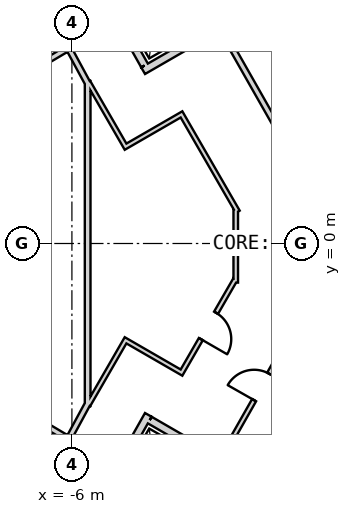
"""IFC4 building model, lengths in metres.
Left out: names, types, materials, properties, quantities, classifications, styles, units other than length and angle.
Written with IfcOpenShell. Run it as: python <this file> out.ifc"""

import sys

from ifc_helpers import new_model, si_unit, direction, frame, frame_2d, origin, place, context, subcontext, project, spatial, rectangle, extrude, element, fill, save


model = new_model("IFC4")
c1 = context("Model", 3, precision=1e-05, world=origin(), true_north=direction((0.0, 1.0)))
c2 = subcontext(c1, "Body", "Model", "MODEL_VIEW")
j1 = project(units=[si_unit("LENGTHUNIT", "METRE"), si_unit("PLANEANGLEUNIT", "RADIAN")], contexts=[c1])
p1 = place(None, origin())
s1 = spatial("IfcSite", under=j1, at=p1, CompositionType="ELEMENT")
p2 = place(p1, origin())
s2 = spatial("IfcBuilding", under=s1, at=p2, CompositionType="ELEMENT")
p3 = place(p2, frame((0.0, 0.0, 392.3)))
s3 = spatial("IfcBuildingStorey", under=s2, at=p3, CompositionType="ELEMENT", Elevation=392.3)
p4 = place(p3, frame((19.475, 2.208, 0.0), z_axis=(0.0, 0.0, 1.0), x_axis=(-0.866028369851, 0.499994862586, 0.0)))
e1 = element("IfcWall", 1, at=p4, inside=s3, PredefinedType="SHEAR", context=c2, shape_type="SweptSolid", body=[
    extrude(rectangle(XDim=31.523, YDim=0.9, at=frame_2d((15.762, 0.0))), origin(), (0.0, 0.0, 1.0), 6.0),
])
p5 = place(p4, frame((7.062, 0.0, 0.0)))
e2 = element("IfcOpeningElement", 2, at=p5, cuts=e1, PredefinedType="OPENING", context=c2, shape_type="SweptSolid", body=[
    extrude(rectangle(XDim=1.2, YDim=2.4, at=frame_2d((0.6, 1.2))), frame((0.0, 0.46, 0.0), z_axis=(0.0, -1.0, 0.0), x_axis=(1.0, 0.0, 0.0)), (0.0, 0.0, 1.0), 0.92),
])
p6 = place(p4, frame((3.612, 0.0, 0.0)))
e3 = element("IfcOpeningElement", 3, at=p6, cuts=e1, PredefinedType="OPENING", context=c2, shape_type="SweptSolid", body=[
    extrude(rectangle(XDim=1.2, YDim=2.4, at=frame_2d((0.6, 1.2))), frame((0.0, 0.46, 0.0), z_axis=(0.0, -1.0, 0.0), x_axis=(1.0, 0.0, 0.0)), (0.0, 0.0, 1.0), 0.92),
])
p7 = place(p4, frame((26.712, 0.0, 0.0)))
e4 = element("IfcOpeningElement", 4, at=p7, cuts=e1, PredefinedType="OPENING", context=c2, shape_type="SweptSolid", body=[
    extrude(rectangle(XDim=1.2, YDim=2.4, at=frame_2d((0.6, 1.2))), frame((0.0, 0.46, 0.0), z_axis=(0.0, -1.0, 0.0), x_axis=(1.0, 0.0, 0.0)), (0.0, 0.0, 1.0), 0.92),
])
p8 = place(p3, frame((-7.825, -17.97, 0.0), z_axis=(0.0, 0.0, 1.0), x_axis=(0.866028369851, 0.499994862586, 0.0)))
e5 = element("IfcWall", 5, at=p8, inside=s3, PredefinedType="SHEAR", context=c2, shape_type="SweptSolid", body=[
    extrude(rectangle(XDim=31.523, YDim=0.9, at=frame_2d((15.762, 0.0))), origin(), (0.0, 0.0, 1.0), 6.0),
])
p9 = place(p8, frame((7.062, 0.0, 0.0)))
e6 = element("IfcOpeningElement", 6, at=p9, cuts=e5, PredefinedType="OPENING", context=c2, shape_type="SweptSolid", body=[
    extrude(rectangle(XDim=1.2, YDim=2.4, at=frame_2d((0.6, 1.2))), frame((0.0, 0.46, 0.0), z_axis=(0.0, -1.0, 0.0), x_axis=(1.0, 0.0, 0.0)), (0.0, 0.0, 1.0), 0.92),
])
p10 = place(p8, frame((9.762, 0.0, 0.0)))
e7 = element("IfcOpeningElement", 7, at=p10, cuts=e5, PredefinedType="OPENING", context=c2, shape_type="SweptSolid", body=[
    extrude(rectangle(XDim=1.2, YDim=2.4, at=frame_2d((0.6, 1.2))), frame((0.0, 0.46, 0.0), z_axis=(0.0, -1.0, 0.0), x_axis=(1.0, 0.0, 0.0)), (0.0, 0.0, 1.0), 0.92),
])
p11 = place(p8, frame((17.862, 0.0, 0.0)))
e8 = element("IfcOpeningElement", 8, at=p11, cuts=e5, PredefinedType="OPENING", context=c2, shape_type="SweptSolid", body=[
    extrude(rectangle(XDim=1.2, YDim=2.4, at=frame_2d((0.6, 1.2))), frame((0.0, 0.46, 0.0), z_axis=(0.0, -1.0, 0.0), x_axis=(1.0, 0.0, 0.0)), (0.0, 0.0, 1.0), 0.92),
])
p12 = place(p8, frame((20.562, 0.0, 0.0)))
e9 = element("IfcOpeningElement", 9, at=p12, cuts=e5, PredefinedType="OPENING", context=c2, shape_type="SweptSolid", body=[
    extrude(rectangle(XDim=1.2, YDim=2.4, at=frame_2d((0.6, 1.2))), frame((0.0, 0.46, 0.0), z_axis=(0.0, -1.0, 0.0), x_axis=(1.0, 0.0, 0.0)), (0.0, 0.0, 1.0), 0.92),
])
p13 = place(p8, frame((26.712, 0.0, 0.0)))
e10 = element("IfcOpeningElement", 10, at=p13, cuts=e5, PredefinedType="OPENING", context=c2, shape_type="SweptSolid", body=[
    extrude(rectangle(XDim=1.2, YDim=2.4, at=frame_2d((0.6, 1.2))), frame((0.0, 0.46, 0.0), z_axis=(0.0, -1.0, 0.0), x_axis=(1.0, 0.0, 0.0)), (0.0, 0.0, 1.0), 0.92),
])
p14 = place(p8, frame((3.612, 0.0, 0.0)))
e11 = element("IfcOpeningElement", 11, at=p14, cuts=e5, PredefinedType="OPENING", context=c2, shape_type="SweptSolid", body=[
    extrude(rectangle(XDim=1.2, YDim=2.4, at=frame_2d((0.6, 1.2))), frame((0.0, 0.46, 0.0), z_axis=(0.0, -1.0, 0.0), x_axis=(1.0, 0.0, 0.0)), (0.0, 0.0, 1.0), 0.92),
])
p15 = place(p3, frame((-2.043, 5.748, 0.0), z_axis=(0.0, 0.0, 1.0), x_axis=(-0.866035096217, -0.499983211839, 0.0)))
e12 = element("IfcWall", 12, at=p15, inside=s3, PredefinedType="PLUMBINGWALL", context=c2, shape_type="SweptSolid", body=[
    extrude(rectangle(XDim=2.404, YDim=0.2, at=frame_2d((1.202, 0.0))), origin(), (0.0, 0.0, 1.0), 5.7),
])
p16 = place(p3, frame((-5.562, 7.296, 0.0), z_axis=(0.0, 0.0, 1.0), x_axis=(0.49134651263, -0.870964180966, 0.0)))
e13 = element("IfcWall", 13, at=p16, inside=s3, PredefinedType="PLUMBINGWALL", context=c2, shape_type="SweptSolid", body=[
    extrude(rectangle(XDim=3.0, YDim=0.2, at=frame_2d((1.5, 0.0))), origin(), (0.0, 0.0, 1.0), 5.7),
])
p17 = place(p3, frame((-3.99, -4.509, 0.0), z_axis=(0.0, 0.0, 1.0), x_axis=(-0.491358283181, -0.870957540612, 0.0)))
e14 = element("IfcWall", 14, at=p17, inside=s3, PredefinedType="PLUMBINGWALL", context=c2, shape_type="SweptSolid", body=[
    extrude(rectangle(XDim=3.2, YDim=0.2, at=frame_2d((1.6, 0.0))), origin(), (0.0, 0.0, 1.0), 5.7),
])
p18 = place(p3, frame((-3.953, -4.646, 0.0), z_axis=(0.0, 0.0, 1.0), x_axis=(0.866038900241, -0.499976622722, 0.0)))
e15 = element("IfcWall", 15, at=p18, inside=s3, PredefinedType="PLUMBINGWALL", context=c2, shape_type="SweptSolid", body=[
    extrude(rectangle(XDim=2.189, YDim=0.2, at=frame_2d((1.095, 0.0))), origin(), (0.0, 0.0, 1.0), 5.7),
])
p19 = place(p3, frame((-2.059, 5.624, 0.0), z_axis=(0.0, 0.0, 1.0), x_axis=(0.494149180773, -0.869377125959, 0.0)))
e16 = element("IfcWall", 16, at=p19, inside=s3, PredefinedType="PLUMBINGWALL", context=c2, shape_type="SweptSolid", body=[
    extrude(rectangle(XDim=4.231, YDim=0.15, at=frame_2d((2.116, 0.0))), origin(), (0.0, 0.0, 1.0), 5.7),
])
p20 = place(p3, frame((0.094, -1.836, 0.0), z_axis=(0.0, 0.0, 1.0), x_axis=(-0.494097972448, -0.869406230495, 0.0)))
e17 = element("IfcWall", 17, at=p20, inside=s3, PredefinedType="PARTITIONING", context=c2, shape_type="SweptSolid", body=[
    extrude(rectangle(XDim=4.357, YDim=0.12, at=frame_2d((2.179, 0.0))), origin(), (0.0, 0.0, 1.0), 5.7),
])
p21 = place(p20, frame((1.83, 0.0, 0.0)))
e18 = element("IfcOpeningElement", 18, at=p21, cuts=e17, PredefinedType="OPENING", context=c2, shape_type="SweptSolid", body=[
    extrude(rectangle(XDim=0.8, YDim=2.1, at=frame_2d((0.4, 1.05))), frame((0.0, 0.07, 0.0), z_axis=(0.0, -1.0, 0.0), x_axis=(1.0, 0.0, 0.0)), (0.0, 0.0, 1.0), 0.14),
])
p22 = place(p3, frame((-5.586, -4.275, 0.0), z_axis=(0.0, 0.0, 1.0), x_axis=(0.0, 1.0, 0.0)))
e19 = element("IfcWall", 19, at=p22, inside=s3, PredefinedType="PLUMBINGWALL", context=c2, shape_type="SweptSolid", body=[
    extrude(rectangle(XDim=8.549, YDim=0.15, at=frame_2d((4.275, 0.0))), origin(), (0.0, 0.0, 1.0), 5.7),
])
p23 = place(p3, frame((-6.124, -5.211, 0.0), z_axis=(0.0, 0.0, 1.0), x_axis=(0.476228984866, 0.879321303036, 0.0)))
e20 = element("IfcWall", 20, at=p23, inside=s3, PredefinedType="PLUMBINGWALL", context=c2, shape_type="SweptSolid", body=[
    extrude(rectangle(XDim=1.162, YDim=0.15, at=frame_2d((0.581, 0.0))), origin(), (0.0, 0.0, 1.0), 5.7),
])
p24 = place(p3, frame((-7.95, -4.041, 0.0), z_axis=(0.0, 0.0, 1.0), x_axis=(0.860090281069, -0.510141851263, 0.0)))
e21 = element("IfcWall", 21, at=p24, inside=s3, PredefinedType="PLUMBINGWALL", context=c2, shape_type="SweptSolid", body=[
    extrude(rectangle(XDim=2.089, YDim=0.15, at=frame_2d((1.045, 0.0))), origin(), (0.0, 0.0, 1.0), 5.7),
])
p25 = place(p3, frame((-6.024, 5.183, 0.0), z_axis=(0.0, 0.0, 1.0), x_axis=(-0.860126804455, -0.510080268447, 0.0)))
e22 = element("IfcWall", 22, at=p25, inside=s3, PredefinedType="PLUMBINGWALL", context=c2, shape_type="SweptSolid", body=[
    extrude(rectangle(XDim=2.24, YDim=0.15, at=frame_2d((1.12, 0.0))), origin(), (0.0, 0.0, 1.0), 5.7),
])
p26 = place(p25, frame((0.757, 0.0, 0.0)))
e23 = element("IfcOpeningElement", 23, at=p26, cuts=e22, PredefinedType="OPENING", context=c2, shape_type="SweptSolid", body=[
    extrude(rectangle(XDim=0.8, YDim=2.1, at=frame_2d((0.4, 1.05))), frame((0.0, 0.085, 0.0), z_axis=(0.0, -1.0, 0.0), x_axis=(1.0, 0.0, 0.0)), (0.0, 0.0, 1.0), 0.17),
])
p27 = place(p3, frame((-5.571, 4.19, 0.0), z_axis=(0.0, 0.0, 1.0), x_axis=(-0.476127658675, 0.879376172434, 0.0)))
e24 = element("IfcWall", 24, at=p27, inside=s3, PredefinedType="PLUMBINGWALL", context=c2, shape_type="SweptSolid", body=[
    extrude(rectangle(XDim=1.012, YDim=0.15, at=frame_2d((0.506, 0.0))), origin(), (0.0, 0.0, 1.0), 5.7),
])
p28 = place(p3, frame((-4.558, 2.495, 0.0), z_axis=(0.0, 0.0, 1.0), x_axis=(-0.499990325971, 0.866030989016, 0.0)))
e25 = element("IfcWall", 25, at=p28, inside=s3, PredefinedType="PARTITIONING", context=c2, shape_type="SweptSolid", body=[
    extrude(rectangle(XDim=2.025, YDim=0.12, at=frame_2d((1.012, 0.0))), origin(), (0.0, 0.0, 1.0), 5.7),
])
p29 = place(p3, frame((-3.064, 3.427, 0.0), z_axis=(0.0, 0.0, 1.0), x_axis=(-0.866087547558, -0.499892348375, 0.0)))
e26 = element("IfcWall", 26, at=p29, inside=s3, PredefinedType="PARTITIONING", context=c2, shape_type="SweptSolid", body=[
    extrude(rectangle(XDim=1.7, YDim=0.12, at=frame_2d((0.85, 0.0))), origin(), (0.0, 0.0, 1.0), 5.7),
])
p30 = place(p3, frame((-1.637, 0.835, 0.0), z_axis=(0.0, 0.0, 1.0), x_axis=(-0.499980071345, 0.866036909293, 0.0)))
e27 = element("IfcWall", 27, at=p30, inside=s3, PredefinedType="PARTITIONING", context=c2, shape_type="SweptSolid", body=[
    extrude(rectangle(XDim=2.898, YDim=0.12, at=frame_2d((1.449, 0.0))), origin(), (0.0, 0.0, 1.0), 5.7),
])
p31 = place(p3, frame((-1.689, -1.029, 0.0), z_axis=(0.0, 0.0, 1.0), x_axis=(0.0, 1.0, 0.0)))
e28 = element("IfcWall", 28, at=p31, inside=s3, PredefinedType="PARTITIONING", context=c2, shape_type="SweptSolid", body=[
    extrude(rectangle(XDim=1.935, YDim=0.12, at=frame_2d((0.968, 0.0))), origin(), (0.0, 0.0, 1.0), 5.7),
])
p32 = place(p3, frame((-3.146, -3.449, 0.0), z_axis=(0.0, 0.0, 1.0), x_axis=(0.500028961621, 0.866008682139, 0.0)))
e29 = element("IfcWall", 29, at=p32, inside=s3, PredefinedType="PARTITIONING", context=c2, shape_type="SweptSolid", body=[
    extrude(rectangle(XDim=2.896, YDim=0.12, at=frame_2d((1.448, 0.0))), origin(), (0.0, 0.0, 1.0), 5.7),
])
p33 = place(p32, frame((1.078, 0.0, 0.0)))
e30 = element("IfcOpeningElement", 30, at=p33, cuts=e29, PredefinedType="OPENING", context=c2, shape_type="SweptSolid", body=[
    extrude(rectangle(XDim=0.8, YDim=2.1, at=frame_2d((0.4, 1.05))), frame((0.0, 0.07, 0.0), z_axis=(0.0, -1.0, 0.0), x_axis=(1.0, 0.0, 0.0)), (0.0, 0.0, 1.0), 0.14),
])
p34 = place(p3, frame((-4.64, -2.517, 0.0), z_axis=(0.0, 0.0, 1.0), x_axis=(0.865989465428, -0.500062241894, 0.0)))
e31 = element("IfcWall", 31, at=p34, inside=s3, PredefinedType="PARTITIONING", context=c2, shape_type="SweptSolid", body=[
    extrude(rectangle(XDim=1.7, YDim=0.12, at=frame_2d((0.85, 0.0))), origin(), (0.0, 0.0, 1.0), 5.7),
])
p35 = place(p3, frame((-5.571, -4.249, 0.0), z_axis=(0.0, 0.0, 1.0), x_axis=(0.500081145431, 0.865978549379, 0.0)))
e32 = element("IfcWall", 32, at=p35, inside=s3, PredefinedType="PARTITIONING", context=c2, shape_type="SweptSolid", body=[
    extrude(rectangle(XDim=1.905, YDim=0.12, at=frame_2d((0.953, 0.0))), origin(), (0.0, 0.0, 1.0), 5.7),
])
p36 = place(p21, origin())
e33 = element("IfcDoor", 33, at=p36, inside=s3, OperationType="SINGLE_SWING_RIGHT", PredefinedType="USERDEFINED", context=c2, shape_type="SweptSolid", body=[
    extrude(rectangle(XDim=0.8, YDim=2.1, at=frame_2d((0.4, 1.05))), frame((0.0, 0.025, 0.0), z_axis=(0.0, -1.0, 0.0), x_axis=(1.0, 0.0, 0.0)), (0.0, 0.0, 1.0), 0.05),
])
fill(e18, e33)
p37 = place(p33, origin())
e34 = element("IfcDoor", 34, at=p37, inside=s3, OperationType="SINGLE_SWING_LEFT", PredefinedType="USERDEFINED", context=c2, shape_type="SweptSolid", body=[
    extrude(rectangle(XDim=0.8, YDim=2.1, at=frame_2d((0.4, 1.05))), frame((0.0, 0.025, 0.0), z_axis=(0.0, -1.0, 0.0), x_axis=(1.0, 0.0, 0.0)), (0.0, 0.0, 1.0), 0.05),
])
fill(e30, e34)
save(model, sys.argv[1])
